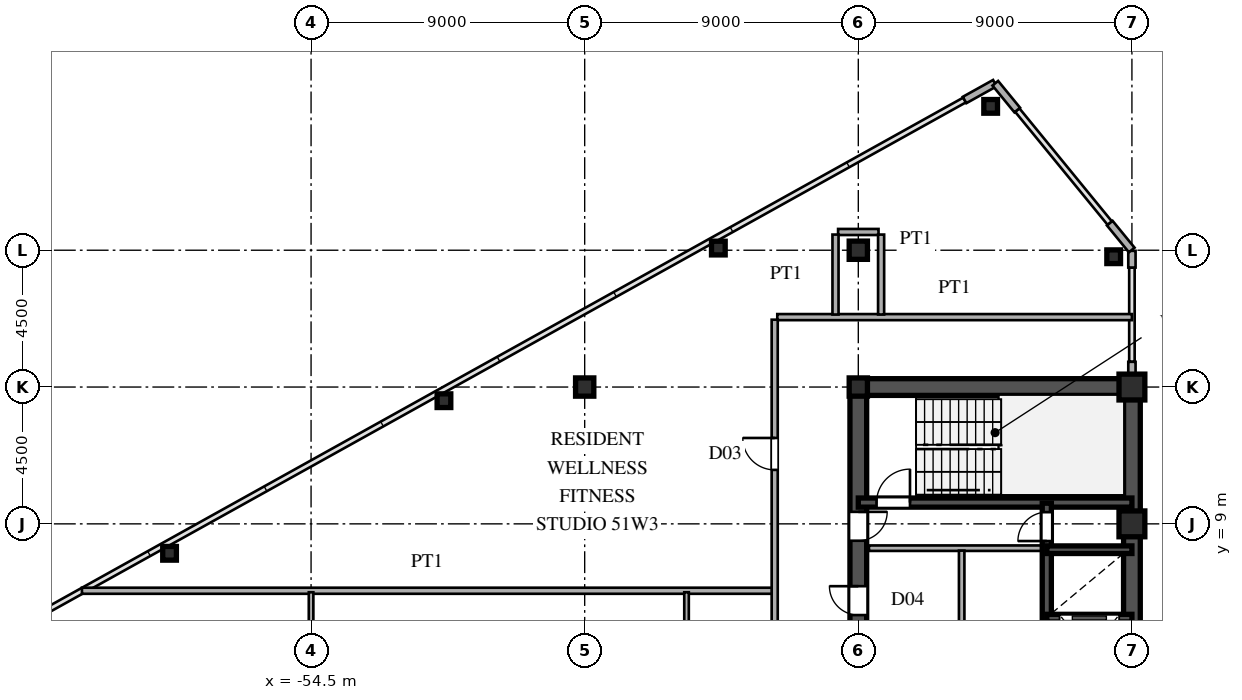
"""IFC4 building model, lengths in metres.
Left out: names, types, materials, properties, quantities, classifications, styles, units other than length and angle.
Written with IfcOpenShell. Run it as: python <this file> out.ifc"""

import sys

from ifc_helpers import new_model, si_unit, direction, frame, frame_2d, origin, origin_2d, place, context, subcontext, project, spatial, rectangle, hollow_rectangle, i_section, extrude, source, transform, mapped, element, fill, save


model = new_model("IFC4")
c1 = context("Model", 3, precision=1e-05, world=origin(), true_north=direction((0.0, 1.0)))
c2 = subcontext(c1, "Body", "Model", "MODEL_VIEW")
j1 = project(units=[si_unit("LENGTHUNIT", "METRE"), si_unit("PLANEANGLEUNIT", "RADIAN")], contexts=[c1])
p1 = place(None, origin())
s1 = spatial("IfcSite", under=j1, at=p1, CompositionType="ELEMENT")
p2 = place(p1, origin())
s2 = spatial("IfcBuilding", under=s1, at=p2, CompositionType="ELEMENT")
p3 = place(p2, frame((0.0, 0.0, 192.3)))
s3 = spatial("IfcBuildingStorey", under=s2, at=p3, CompositionType="ELEMENT", Elevation=192.3)
m1 = source(origin(), c2, "Body", "SweptSolid", [
    extrude(hollow_rectangle(XDim=0.85, YDim=0.85, WallThickness=0.036, at=origin_2d()), origin(), (0.0, 0.0, 1.0), 3.6),
])
for number, where, z_axis, x_axis in (
    (1, (-27.5, 9.0, 0.0), (0.0, 0.0, 1.0), (1.0, 0.0, 0.0)),
    (2, (-27.5, 13.5, 0.0), (0.0, 0.0, 1.0), (1.0, 0.0, 0.0)),
):
    element("IfcColumn", number, at=place(p3, frame(where, z_axis=z_axis, x_axis=x_axis)), inside=s3, PredefinedType="COLUMN", context=c2, shape_type="MappedRepresentation", body=[
        mapped(m1, transform((0.0, 0.0, 0.0), scale=1.0)),
    ])
m2 = source(origin(), c2, "Body", "SweptSolid", [
    extrude(i_section(OverallWidth=0.6, OverallDepth=0.6, WebThickness=0.025, FlangeThickness=0.04, at=origin_2d()), origin(), (0.0, 0.0, 1.0), 3.6),
])
for number, where, z_axis, x_axis in (
    (3, (-36.5, 13.5, 0.0), (0.0, 0.0, 1.0), (1.0, 0.0, 0.0)),
    (4, (-36.5, 18.0, 0.0), (0.0, 0.0, 1.0), (1.0, 0.0, 0.0)),
    (5, (-45.5, 13.5, 0.0), (0.0, 0.0, 1.0), (1.0, 0.0, 0.0)),
):
    element("IfcColumn", number, at=place(p3, frame(where, z_axis=z_axis, x_axis=x_axis)), inside=s3, PredefinedType="COLUMN", context=c2, shape_type="MappedRepresentation", body=[
        mapped(m2, transform((0.0, 0.0, 0.0), scale=1.0)),
    ])
m3 = source(origin(), c2, "Body", "SweptSolid", [
    extrude(hollow_rectangle(XDim=0.45, YDim=0.45, WallThickness=0.018, at=origin_2d()), origin(), (0.0, 0.0, 1.0), 3.6),
])
for number, where, z_axis, x_axis in (
    (6, (-28.1, 17.786, 0.0), (0.0, 0.0, 1.0), (1.0, 0.0, 0.0)),
    (7, (-32.147, 22.732, 0.0), (0.0, 0.0, 1.0), (1.0, 0.0, 0.0)),
    (8, (-41.104, 18.071, 0.0), (0.0, 0.0, 1.0), (1.0, 0.0, 0.0)),
    (9, (-50.129, 13.051, 0.0), (0.0, 0.0, 1.0), (1.0, 0.0, 0.0)),
    (10, (-59.155, 8.031, 0.0), (0.0, 0.0, 1.0), (1.0, 0.0, 0.0)),
):
    element("IfcColumn", number, at=place(p3, frame(where, z_axis=z_axis, x_axis=x_axis)), inside=s3, PredefinedType="COLUMN", context=c2, shape_type="MappedRepresentation", body=[
        mapped(m3, transform((0.0, 0.0, 0.0), scale=1.0)),
    ])
p4 = place(p3, frame((-27.5, 13.78, 0.0), z_axis=(0.0, 0.0, 1.0), x_axis=(0.0, 1.0, 0.0)))
e11 = element("IfcWall", 11, at=p4, inside=s3, PredefinedType="SOLIDWALL", context=c2, shape_type="SweptSolid", body=[
    extrude(rectangle(XDim=0.55, YDim=0.24, at=frame_2d((0.275, 0.0))), origin(), (0.0, 0.0, 1.0), 1.88),
])
p5 = place(p3, frame((-27.5, 17.43, 0.0), z_axis=(0.0, 0.0, 1.0), x_axis=(0.0, 1.0, 0.0)))
e12 = element("IfcWall", 12, at=p5, inside=s3, PredefinedType="SOLIDWALL", context=c2, shape_type="SweptSolid", body=[
    extrude(rectangle(XDim=0.55, YDim=0.24, at=frame_2d((0.275, 0.0))), origin(), (0.0, 0.0, 1.0), 3.38),
])
for number, where, z_axis, x_axis in (
    (13, (-27.506, 18.008, 0.0), (0.0, 0.0, 1.0), (-0.633, 0.774, 0.0)),
    (14, (-31.272, 22.61, 0.0), (0.0, 0.0, 1.0), (-0.633, 0.774, 0.0)),
):
    element("IfcWall", number, at=place(p3, frame(where, z_axis=z_axis, x_axis=x_axis)), inside=s3, PredefinedType="SOLIDWALL", context=c2, shape_type="SweptSolid", body=[
        extrude(rectangle(XDim=1.14, YDim=0.24, at=frame_2d((0.57, 0.0))), origin(), (0.0, 0.0, 1.0), 3.38),
    ])
p6 = place(p3, frame((-32.009, 23.495, 0.0), z_axis=(0.0, 0.0, 1.0), x_axis=(-0.87385402111, -0.486188389196, 0.0)))
e15 = element("IfcWall", 15, at=p6, inside=s3, PredefinedType="SOLIDWALL", context=c2, shape_type="SweptSolid", body=[
    extrude(rectangle(XDim=1.14, YDim=0.24, at=frame_2d((0.57, 0.0))), origin(), (0.0, 0.0, 1.0), 3.38),
])
p7 = place(p3, frame((-27.5, 1.3, 0.0), z_axis=(0.0, 0.0, 1.0), x_axis=(0.0, 1.0, 0.0)))
e16 = element("IfcWall", 16, at=p7, inside=s3, PredefinedType="SHEAR", context=c2, shape_type="SweptSolid", body=[
    extrude(rectangle(XDim=12.2, YDim=0.55, at=frame_2d((6.1, 0.0))), origin(), (0.0, 0.0, 1.0), 3.38),
])
p8 = place(p3, frame((-36.5, 13.5, 0.0), z_axis=(0.0, 0.0, 1.0), x_axis=(1.0, 0.0, 0.0)))
e17 = element("IfcWall", 17, at=p8, inside=s3, PredefinedType="SHEAR", context=c2, shape_type="SweptSolid", body=[
    extrude(rectangle(XDim=9.0, YDim=0.55, at=frame_2d((4.5, 0.0))), origin(), (0.0, 0.0, 1.0), 3.38),
])
p9 = place(p3, frame((-36.5, 8.2, 0.0), z_axis=(0.0, 0.0, 1.0), x_axis=(0.0, 1.0, 0.0)))
e18 = element("IfcWall", 18, at=p9, inside=s3, PredefinedType="SHEAR", context=c2, shape_type="SweptSolid", body=[
    extrude(rectangle(XDim=5.45, YDim=0.55, at=frame_2d((2.725, 0.0))), origin(), (0.0, 0.0, 1.0), 3.38),
])
p10 = place(p9, frame((0.245, 0.0, 0.0)))
e19 = element("IfcOpeningElement", 19, at=p10, cuts=e18, PredefinedType="OPENING", context=c2, shape_type="SweptSolid", body=[
    extrude(rectangle(XDim=0.95, YDim=2.15, at=frame_2d((0.475, 1.075))), frame((0.0, 0.285, 0.0), z_axis=(0.0, -1.0, 0.0), x_axis=(1.0, 0.0, 0.0)), (0.0, 0.0, 1.0), 0.57),
])
p11 = place(p3, frame((-36.5, 4.75, 0.0), z_axis=(0.0, 0.0, 1.0), x_axis=(0.0, 1.0, 0.0)))
e20 = element("IfcWall", 20, at=p11, inside=s3, PredefinedType="SHEAR", context=c2, shape_type="SweptSolid", body=[
    extrude(rectangle(XDim=3.45, YDim=0.55, at=frame_2d((1.725, 0.0))), origin(), (0.0, 0.0, 1.0), 3.38),
])
p12 = place(p11, frame((1.25, 0.0, 0.0)))
e21 = element("IfcOpeningElement", 21, at=p12, cuts=e20, PredefinedType="OPENING", context=c2, shape_type="SweptSolid", body=[
    extrude(rectangle(XDim=0.95, YDim=2.15, at=frame_2d((0.475, 1.075))), frame((0.0, 0.285, 0.0), z_axis=(0.0, -1.0, 0.0), x_axis=(1.0, 0.0, 0.0)), (0.0, 0.0, 1.0), 0.57),
])
p13 = place(p3, frame((-36.5, 9.7, 0.0), z_axis=(0.0, 0.0, 1.0), x_axis=(1.0, 0.0, 0.0)))
e22 = element("IfcWall", 22, at=p13, inside=s3, PredefinedType="SHEAR", context=c2, shape_type="SweptSolid", body=[
    extrude(rectangle(XDim=9.0, YDim=0.3, at=frame_2d((4.5, 0.0))), origin(), (0.0, 0.0, 1.0), 3.38),
])
p14 = place(p13, frame((0.6, 0.0, 0.0)))
e23 = element("IfcOpeningElement", 23, at=p14, cuts=e22, PredefinedType="OPENING", context=c2, shape_type="SweptSolid", body=[
    extrude(rectangle(XDim=1.1, YDim=2.2, at=frame_2d((0.55, 1.1))), frame((0.0, 0.16, 0.0), z_axis=(0.0, -1.0, 0.0), x_axis=(1.0, 0.0, 0.0)), (0.0, 0.0, 1.0), 0.32),
])
for number, where, z_axis, x_axis in (
    (24, (-30.3, 5.9, 0.0), (0.0, 0.0, 1.0), (1.0, 0.0, 0.0)),
    (25, (-30.3, 8.15, 0.0), (0.0, 0.0, 1.0), (1.0, 0.0, 0.0)),
):
    element("IfcWall", number, at=place(p3, frame(where, z_axis=z_axis, x_axis=x_axis)), inside=s3, PredefinedType="SHEAR", context=c2, shape_type="SweptSolid", body=[
        extrude(rectangle(XDim=2.8, YDim=0.25, at=frame_2d((1.4, 0.0))), origin(), (0.0, 0.0, 1.0), 3.38),
    ])
p15 = place(p3, frame((-30.3, 3.6, 0.0), z_axis=(0.0, 0.0, 1.0), x_axis=(0.0, 1.0, 0.0)))
e26 = element("IfcWall", 26, at=p15, inside=s3, PredefinedType="SHEAR", context=c2, shape_type="SweptSolid", body=[
    extrude(rectangle(XDim=2.3, YDim=0.3, at=frame_2d((1.15, 0.0))), origin(), (0.0, 0.0, 1.0), 3.38),
])
p16 = place(p15, frame((0.6, 0.0, 0.0)))
e27 = element("IfcOpeningElement", 27, at=p16, cuts=e26, PredefinedType="OPENING", context=c2, shape_type="SweptSolid", body=[
    extrude(rectangle(XDim=1.1, YDim=2.2, at=frame_2d((0.55, 1.1))), frame((0.0, 0.16, 0.0), z_axis=(0.0, -1.0, 0.0), x_axis=(1.0, 0.0, 0.0)), (0.0, 0.0, 1.0), 0.32),
])
p17 = place(p3, frame((-30.3, 5.9, 0.0), z_axis=(0.0, 0.0, 1.0), x_axis=(0.0, 1.0, 0.0)))
e28 = element("IfcWall", 28, at=p17, inside=s3, PredefinedType="SHEAR", context=c2, shape_type="SweptSolid", body=[
    extrude(rectangle(XDim=2.25, YDim=0.3, at=frame_2d((1.125, 0.0))), origin(), (0.0, 0.0, 1.0), 3.38),
])
p18 = place(p3, frame((-30.3, 8.15, 0.0), z_axis=(0.0, 0.0, 1.0), x_axis=(0.0, 1.0, 0.0)))
e29 = element("IfcWall", 29, at=p18, inside=s3, PredefinedType="SHEAR", context=c2, shape_type="SweptSolid", body=[
    extrude(rectangle(XDim=1.53, YDim=0.3, at=frame_2d((0.765, 0.0))), origin(), (0.0, 0.0, 1.0), 3.38),
])
p19 = place(p18, frame((0.285, 0.0, 0.0)))
e30 = element("IfcOpeningElement", 30, at=p19, cuts=e29, PredefinedType="OPENING", context=c2, shape_type="SweptSolid", body=[
    extrude(rectangle(XDim=0.95, YDim=2.15, at=frame_2d((0.475, 1.075))), frame((0.0, 0.16, 0.0), z_axis=(0.0, -1.0, 0.0), x_axis=(1.0, 0.0, 0.0)), (0.0, 0.0, 1.0), 0.32),
])
p20 = place(p3, frame((-36.15, 8.2, 0.0), z_axis=(0.0, 0.0, 1.0), x_axis=(1.0, 0.0, 0.0)))
e31 = element("IfcWall", 31, at=p20, inside=s3, PredefinedType="PARTITIONING", context=c2, shape_type="SweptSolid", body=[
    extrude(rectangle(XDim=5.7, YDim=0.18, at=frame_2d((2.85, 0.0))), origin(), (0.0, 0.0, 1.0), 3.38),
])
p21 = place(p3, frame((-33.1, 1.38, 0.0), z_axis=(0.0, 0.0, 1.0), x_axis=(0.0, 1.0, 0.0)))
e32 = element("IfcWall", 32, at=p21, inside=s3, PredefinedType="PARTITIONING", context=c2, shape_type="SweptSolid", body=[
    extrude(rectangle(XDim=6.74, YDim=0.18, at=frame_2d((3.37, 0.0))), origin(), (0.0, 0.0, 1.0), 3.38),
])
p22 = place(p3, frame((-62.037, 6.8, 0.0), z_axis=(0.0, 0.0, 1.0), x_axis=(1.0, 0.0, 0.0)))
e33 = element("IfcWall", 33, at=p22, inside=s3, PredefinedType="PARTITIONING", context=c2, shape_type="SweptSolid", body=[
    extrude(rectangle(XDim=22.707, YDim=0.2, at=frame_2d((11.354, 0.0))), origin(), (0.0, 0.0, 1.0), 3.38),
])
p23 = place(p3, frame((-39.165, 15.8, 0.0), z_axis=(0.0, 0.0, 1.0), x_axis=(1.0, 0.0, 0.0)))
e34 = element("IfcWall", 34, at=p23, inside=s3, PredefinedType="PARTITIONING", context=c2, shape_type="SweptSolid", body=[
    extrude(rectangle(XDim=11.665, YDim=0.2, at=frame_2d((5.833, 0.0))), origin(), (0.0, 0.0, 1.0), 3.38),
])
p24 = place(p3, frame((-37.165, 18.6, 0.0), z_axis=(0.0, 0.0, 1.0), x_axis=(1.0, 0.0, 0.0)))
e35 = element("IfcWall", 35, at=p24, inside=s3, PredefinedType="PARTITIONING", context=c2, shape_type="SweptSolid", body=[
    extrude(rectangle(XDim=1.33, YDim=0.2, at=frame_2d((0.665, 0.0))), origin(), (0.0, 0.0, 1.0), 3.38),
])
p25 = place(p3, frame((-54.5, -6.75, 0.0), z_axis=(0.0, 0.0, 1.0), x_axis=(0.0, 1.0, 0.0)))
e36 = element("IfcWall", 36, at=p25, inside=s3, PredefinedType="PARTITIONING", context=c2, shape_type="SweptSolid", body=[
    extrude(rectangle(XDim=13.5, YDim=0.15, at=frame_2d((6.75, 0.0))), origin(), (0.0, 0.0, 1.0), 2.78),
])
p26 = place(p25, frame((6.275, 0.0, 0.0)))
e37 = element("IfcOpeningElement", 37, at=p26, cuts=e36, PredefinedType="OPENING", context=c2, shape_type="SweptSolid", body=[
    extrude(rectangle(XDim=0.95, YDim=2.15, at=frame_2d((0.475, 1.075))), frame((0.0, 0.085, 0.0), z_axis=(0.0, -1.0, 0.0), x_axis=(1.0, 0.0, 0.0)), (0.0, 0.0, 1.0), 0.17),
])
p27 = place(p3, frame((-42.15, 2.772, 0.0), z_axis=(0.0, 0.0, 1.0), x_axis=(0.0, 1.0, 0.0)))
e38 = element("IfcWall", 38, at=p27, inside=s3, PredefinedType="PARTITIONING", context=c2, shape_type="SweptSolid", body=[
    extrude(rectangle(XDim=3.978, YDim=0.15, at=frame_2d((1.989, 0.0))), origin(), (0.0, 0.0, 1.0), 3.38),
])
p28 = place(p3, frame((-39.25, -15.715, 0.0), z_axis=(0.0, 0.0, 1.0), x_axis=(0.0, 1.0, 0.0)))
e39 = element("IfcWall", 39, at=p28, inside=s3, PredefinedType="PARTITIONING", context=c2, shape_type="SweptSolid", body=[
    extrude(rectangle(XDim=31.43, YDim=0.2, at=frame_2d((15.715, 0.0))), origin(), (0.0, 0.0, 1.0), 3.38),
])
p29 = place(p28, frame((3.89, 0.0, 0.0)))
e40 = element("IfcOpeningElement", 40, at=p29, cuts=e39, PredefinedType="OPENING", context=c2, shape_type="SweptSolid", body=[
    extrude(rectangle(XDim=1.05, YDim=2.25, at=frame_2d((0.525, 1.125))), frame((0.0, 0.11, 0.0), z_axis=(0.0, -1.0, 0.0), x_axis=(1.0, 0.0, 0.0)), (0.0, 0.0, 1.0), 0.22),
])
p30 = place(p28, frame((14.986, 0.0, 0.0)))
e41 = element("IfcOpeningElement", 41, at=p30, cuts=e39, PredefinedType="OPENING", context=c2, shape_type="SweptSolid", body=[
    extrude(rectangle(XDim=1.05, YDim=2.25, at=frame_2d((0.525, 1.125))), frame((0.0, 0.11, 0.0), z_axis=(0.0, -1.0, 0.0), x_axis=(1.0, 0.0, 0.0)), (0.0, 0.0, 1.0), 0.22),
])
p31 = place(p28, frame((26.49, 0.0, 0.0)))
e42 = element("IfcOpeningElement", 42, at=p31, cuts=e39, PredefinedType="OPENING", context=c2, shape_type="SweptSolid", body=[
    extrude(rectangle(XDim=1.05, YDim=2.25, at=frame_2d((0.525, 1.125))), frame((0.0, 0.11, 0.0), z_axis=(0.0, -1.0, 0.0), x_axis=(1.0, 0.0, 0.0)), (0.0, 0.0, 1.0), 0.22),
])
for number, where, z_axis, x_axis in (
    (43, (-37.25, 15.885, 0.0), (0.0, 0.0, 1.0), (0.0, 1.0, 0.0)),
    (44, (-35.75, 15.885, 0.0), (0.0, 0.0, 1.0), (0.0, 1.0, 0.0)),
):
    element("IfcWall", number, at=place(p3, frame(where, z_axis=z_axis, x_axis=x_axis)), inside=s3, PredefinedType="PARTITIONING", context=c2, shape_type="SweptSolid", body=[
        extrude(rectangle(XDim=2.63, YDim=0.2, at=frame_2d((1.315, 0.0))), origin(), (0.0, 0.0, 1.0), 3.38),
    ])
m4 = source(origin(), c2, "Body", "SweptSolid", [
    extrude(rectangle(XDim=0.95, YDim=2.15, at=frame_2d((0.475, 1.075))), frame((0.0, 0.025, 0.0), z_axis=(0.0, -1.0, 0.0), x_axis=(1.0, 0.0, 0.0)), (0.0, 0.0, 1.0), 0.05),
])
p32 = place(p10, frame((0.95, 0.0, 0.0), z_axis=(0.0, 0.0, 1.0), x_axis=(-1.0, 0.0, 0.0)))
e45 = element("IfcDoor", 45, at=p32, inside=s3, OperationType="SINGLE_SWING_RIGHT", PredefinedType="DOOR", context=c2, shape_type="MappedRepresentation", body=[
    mapped(m4, transform((0.0, 0.0, 0.0), scale=1.0)),
])
fill(e19, e45)
p33 = place(p12, origin())
e46 = element("IfcDoor", 46, at=p33, inside=s3, OperationType="SINGLE_SWING_RIGHT", PredefinedType="DOOR", context=c2, shape_type="MappedRepresentation", body=[
    mapped(m4, transform((0.0, 0.0, 0.0), scale=1.0)),
])
fill(e21, e46)
m5 = source(origin(), c2, "Body", "SweptSolid", [
    extrude(rectangle(XDim=1.1, YDim=2.2, at=frame_2d((0.55, 1.1))), frame((0.0, 0.025, 0.0), z_axis=(0.0, -1.0, 0.0), x_axis=(1.0, 0.0, 0.0)), (0.0, 0.0, 1.0), 0.05),
])
p34 = place(p14, origin())
e47 = element("IfcDoor", 47, at=p34, inside=s3, OperationType="SINGLE_SWING_RIGHT", PredefinedType="DOOR", context=c2, shape_type="MappedRepresentation", body=[
    mapped(m5, transform((0.0, 0.0, 0.0), scale=1.0)),
])
fill(e23, e47)
p35 = place(p19, origin())
e48 = element("IfcDoor", 48, at=p35, inside=s3, OperationType="SINGLE_SWING_LEFT", PredefinedType="DOOR", context=c2, shape_type="MappedRepresentation", body=[
    mapped(m4, transform((0.0, 0.0, 0.0), scale=1.0)),
])
fill(e30, e48)
m6 = source(origin(), c2, "Body", "SweptSolid", [
    extrude(rectangle(XDim=1.05, YDim=2.25, at=frame_2d((0.525, 1.125))), frame((0.0, 0.025, 0.0), z_axis=(0.0, -1.0, 0.0), x_axis=(1.0, 0.0, 0.0)), (0.0, 0.0, 1.0), 0.05),
])
p36 = place(p31, origin())
e49 = element("IfcDoor", 49, at=p36, inside=s3, OperationType="SINGLE_SWING_RIGHT", PredefinedType="DOOR", context=c2, shape_type="MappedRepresentation", body=[
    mapped(m6, transform((0.0, 0.0, 0.0), scale=1.0)),
])
fill(e42, e49)
save(model, sys.argv[1])
